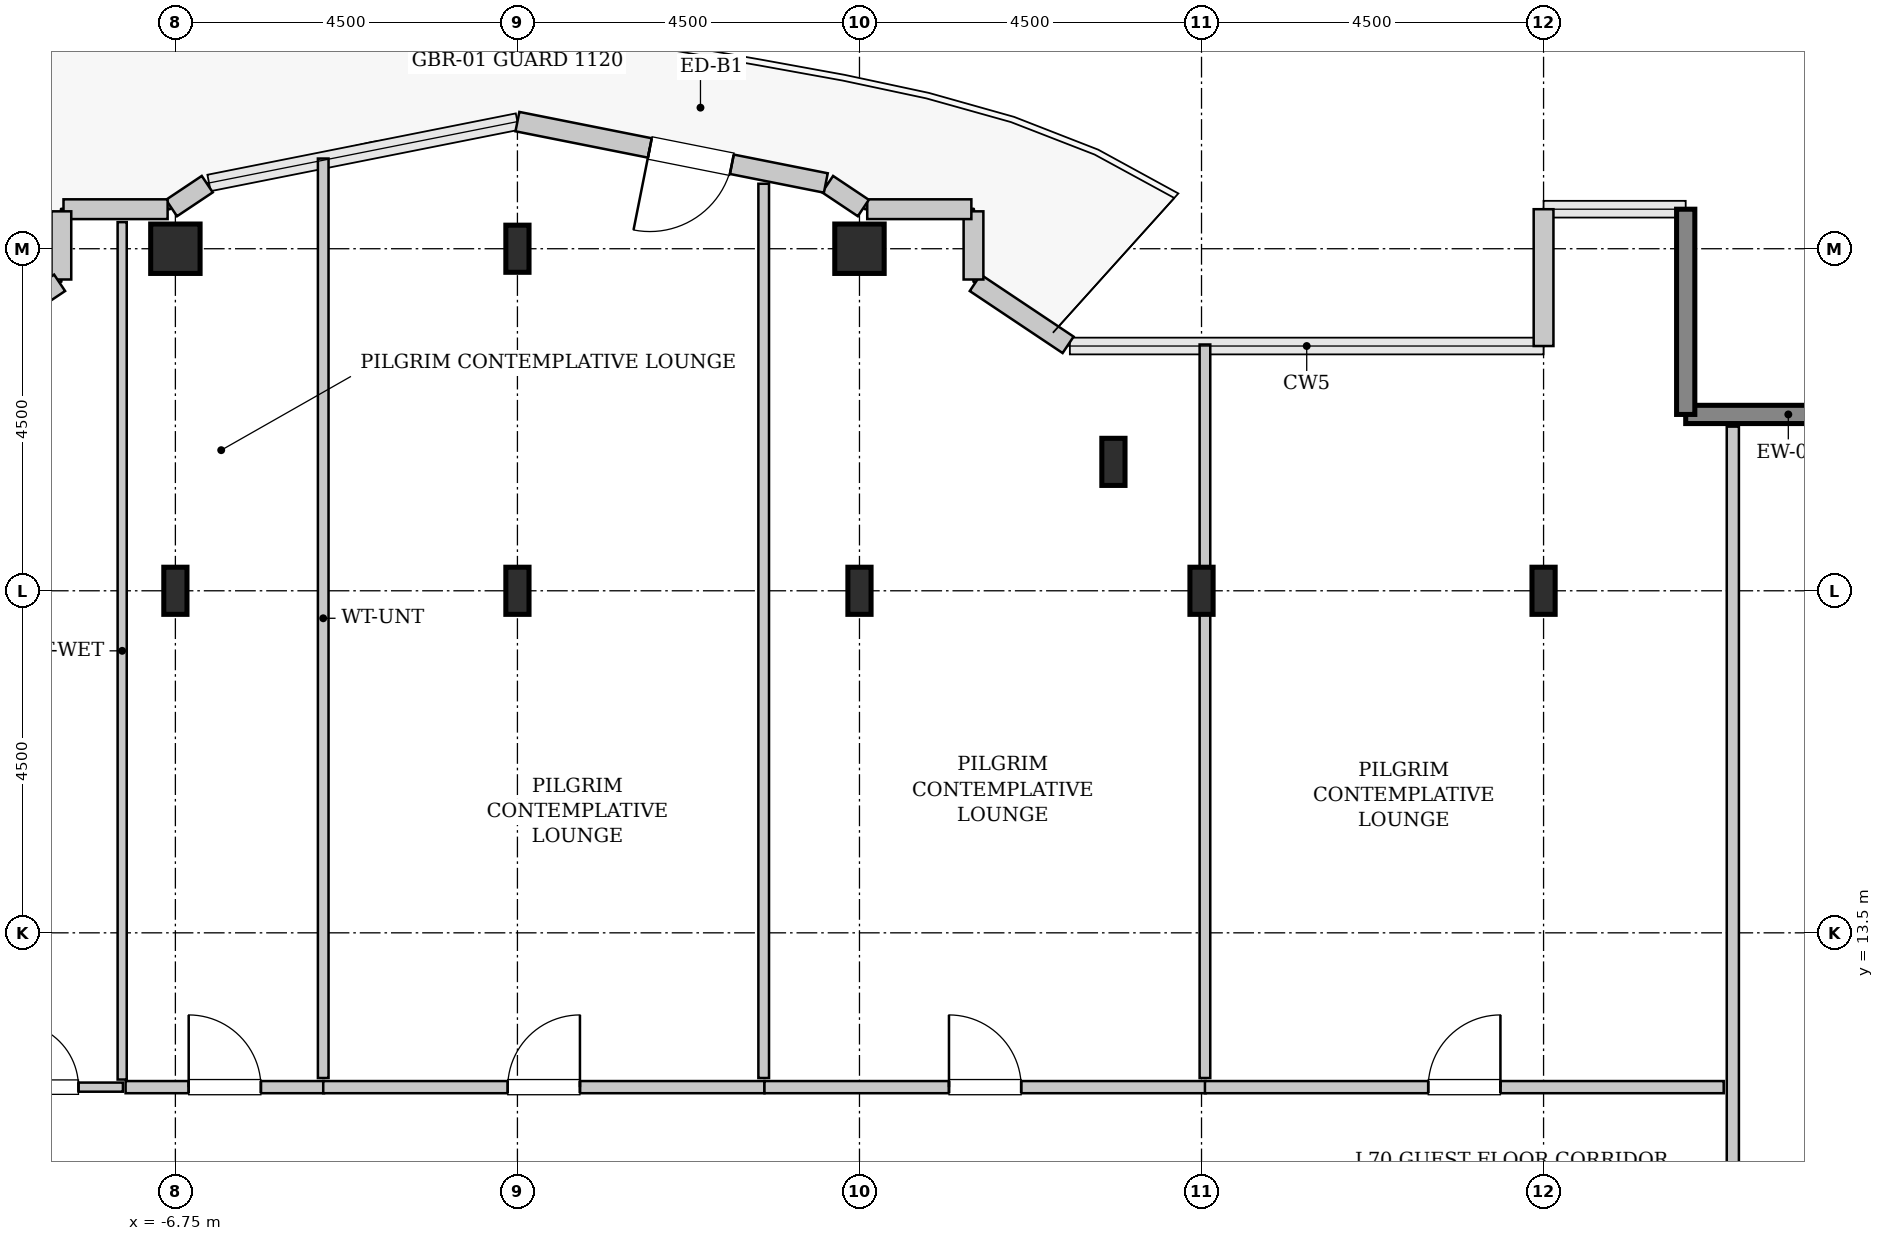
"""IFC4 building model, lengths in metres.
Left out: names, types, materials, properties, quantities, classifications, styles, units other than length and angle.
Written with IfcOpenShell. Run it as: python <this file> out.ifc"""

import sys

from ifc_helpers import new_model, si_unit, direction, frame, frame_2d, origin, origin_2d, place, context, subcontext, project, spatial, rectangle, hollow_rectangle, i_section, extrude, source, transform, mapped, element, fill, save


model = new_model("IFC4")
c1 = context("Model", 3, precision=1e-05, world=origin(), true_north=direction((0.0, 1.0)))
c2 = subcontext(c1, "Body", "Model", "MODEL_VIEW")
j1 = project(units=[si_unit("LENGTHUNIT", "METRE"), si_unit("PLANEANGLEUNIT", "RADIAN")], contexts=[c1])
p1 = place(None, origin())
s1 = spatial("IfcSite", under=j1, at=p1, CompositionType="ELEMENT")
p2 = place(p1, origin())
s2 = spatial("IfcBuilding", under=s1, at=p2, CompositionType="ELEMENT")
p3 = place(p2, frame((0.0, 0.0, 279.8)))
s3 = spatial("IfcBuildingStorey", under=s2, at=p3, CompositionType="ELEMENT", Elevation=279.8)
m1 = source(origin(), c2, "Body", "SweptSolid", [
    extrude(i_section(OverallWidth=0.305, OverallDepth=0.62, WebThickness=0.021, FlangeThickness=0.04, FilletRadius=0.027, at=origin_2d()), origin(), (0.0, 0.0, 1.0), 3.8),
])
p4 = place(p3, frame((-6.75, 18.0, 0.0), z_axis=(0.0, 0.0, 1.0), x_axis=(1.0, 0.0, 0.0)))
e1 = element("IfcColumn", 1, at=p4, inside=s3, PredefinedType="COLUMN", context=c2, shape_type="MappedRepresentation", body=[
    mapped(m1, transform((0.0, 0.0, 0.0), x_axis=(1.0, 0.0, 0.0), y_axis=(0.0, 1.0, 0.0), z_axis=(0.0, 0.0, 1.0), scale=1.0)),
])
m2 = source(origin(), c2, "Body", "SweptSolid", [
    extrude(hollow_rectangle(XDim=0.65, YDim=0.65, WallThickness=0.032, InnerFilletRadius=0.032, OuterFilletRadius=0.064, at=origin_2d()), origin(), (0.0, 0.0, 1.0), 3.8),
])
p5 = place(p3, frame((-6.75, 22.5, 0.0), z_axis=(0.0, 0.0, 1.0), x_axis=(1.0, 0.0, 0.0)))
e2 = element("IfcColumn", 2, at=p5, inside=s3, PredefinedType="COLUMN", context=c2, shape_type="MappedRepresentation", body=[
    mapped(m2, transform((0.0, 0.0, 0.0), x_axis=(1.0, 0.0, 0.0), y_axis=(0.0, 1.0, 0.0), z_axis=(0.0, 0.0, 1.0), scale=1.0)),
])
for number, where, z_axis, x_axis in (
    (3, (-2.25, 18.0, 0.0), (0.0, 0.0, 1.0), (1.0, 0.0, 0.0)),
    (4, (-2.25, 22.5, 0.0), (0.0, 0.0, 1.0), (1.0, 0.0, 0.0)),
    (5, (2.25, 18.0, 0.0), (0.0, 0.0, 1.0), (1.0, 0.0, 0.0)),
):
    element("IfcColumn", number, at=place(p3, frame(where, z_axis=z_axis, x_axis=x_axis)), inside=s3, PredefinedType="COLUMN", context=c2, shape_type="MappedRepresentation", body=[
        mapped(m1, transform((0.0, 0.0, 0.0), x_axis=(1.0, 0.0, 0.0), y_axis=(0.0, 1.0, 0.0), z_axis=(0.0, 0.0, 1.0), scale=1.0)),
    ])
p6 = place(p3, frame((2.25, 22.5, 0.0), z_axis=(0.0, 0.0, 1.0), x_axis=(1.0, 0.0, 0.0)))
e6 = element("IfcColumn", 6, at=p6, inside=s3, PredefinedType="COLUMN", context=c2, shape_type="MappedRepresentation", body=[
    mapped(m2, transform((0.0, 0.0, 0.0), x_axis=(1.0, 0.0, 0.0), y_axis=(0.0, 1.0, 0.0), z_axis=(0.0, 0.0, 1.0), scale=1.0)),
])
for number, where, z_axis, x_axis in (
    (7, (5.591, 19.696, 0.0), (0.0, 0.0, 1.0), (1.0, 0.0, 0.0)),
    (8, (6.75, 18.0, 0.0), (0.0, 0.0, 1.0), (1.0, 0.0, 0.0)),
    (9, (11.25, 18.0, 0.0), (0.0, 0.0, 1.0), (1.0, 0.0, 0.0)),
):
    element("IfcColumn", number, at=place(p3, frame(where, z_axis=z_axis, x_axis=x_axis)), inside=s3, PredefinedType="COLUMN", context=c2, shape_type="MappedRepresentation", body=[
        mapped(m1, transform((0.0, 0.0, 0.0), x_axis=(1.0, 0.0, 0.0), y_axis=(0.0, 1.0, 0.0), z_axis=(0.0, 0.0, 1.0), scale=1.0)),
    ])
m3 = source(origin(), c2, "Body", "SweptSolid", [
    extrude(rectangle(XDim=2.7, YDim=0.24, at=frame_2d((1.35, 0.0))), origin(), (0.0, 0.0, 1.0), 3.55),
])
for number, where, z_axis, x_axis in (
    (10, (15.82, 20.32, 0.0), (0.0, 0.0, 1.0), (-1.0, 0.0, 0.0)),
    (11, (13.12, 20.32, 0.0), (0.0, 0.0, 1.0), (0.0, 1.0, 0.0)),
):
    element("IfcWall", number, at=place(p3, frame(where, z_axis=z_axis, x_axis=x_axis)), inside=s3, PredefinedType="SHEAR", context=c2, shape_type="MappedRepresentation", body=[
        mapped(m3, transform((0.0, 0.0, 0.0), x_axis=(1.0, 0.0, 0.0), y_axis=(0.0, 1.0, 0.0), z_axis=(0.0, 0.0, 1.0), scale=1.0)),
    ])
m4 = source(origin(), c2, "Body", "SweptSolid", [
    extrude(rectangle(XDim=1.8, YDim=0.26, at=frame_2d((0.9, 0.0))), origin(), (0.0, 0.0, 1.0), 3.55),
])
p7 = place(p3, frame((11.25, 23.02, 0.0), z_axis=(0.0, 0.0, 1.0), x_axis=(0.0, -1.0, 0.0)))
e12 = element("IfcWall", 12, at=p7, inside=s3, PredefinedType="SOLIDWALL", context=c2, shape_type="MappedRepresentation", body=[
    mapped(m4, transform((0.0, 0.0, 0.0), x_axis=(1.0, 0.0, 0.0), y_axis=(0.0, 1.0, 0.0), z_axis=(0.0, 0.0, 1.0), scale=1.0)),
])
m5 = source(origin(), c2, "Body", "SweptSolid", [
    extrude(rectangle(XDim=1.469, YDim=0.26, at=frame_2d((0.734, 0.0))), origin(), (0.0, 0.0, 1.0), 3.55),
])
p8 = place(p3, frame((4.995, 21.236, 0.0), z_axis=(0.0, 0.0, 1.0), x_axis=(-0.831461760506, 0.555581983884, 0.0)))
e13 = element("IfcWall", 13, at=p8, inside=s3, PredefinedType="SOLIDWALL", context=c2, shape_type="MappedRepresentation", body=[
    mapped(m5, transform((0.0, 0.0, 0.0), x_axis=(1.0, 0.0, 0.0), y_axis=(0.0, 1.0, 0.0), z_axis=(0.0, 0.0, 1.0), scale=1.0)),
])
m6 = source(origin(), c2, "Body", "SweptSolid", [
    extrude(rectangle(XDim=0.897, YDim=0.26, at=frame_2d((0.448, 0.0))), origin(), (0.0, 0.0, 1.0), 3.55),
])
p9 = place(p3, frame((3.75, 22.095, 0.0), z_axis=(0.0, 0.0, 1.0), x_axis=(0.0, 1.0, 0.0)))
e14 = element("IfcWall", 14, at=p9, inside=s3, PredefinedType="SOLIDWALL", context=c2, shape_type="MappedRepresentation", body=[
    mapped(m6, transform((0.0, 0.0, 0.0), x_axis=(1.0, 0.0, 0.0), y_axis=(0.0, 1.0, 0.0), z_axis=(0.0, 0.0, 1.0), scale=1.0)),
])
m7 = source(origin(), c2, "Body", "SweptSolid", [
    extrude(rectangle(XDim=1.37, YDim=0.26, at=frame_2d((0.685, 0.0))), origin(), (0.0, 0.0, 1.0), 3.55),
])
p10 = place(p3, frame((3.722, 23.02, 0.0), z_axis=(0.0, 0.0, 1.0), x_axis=(-1.0, 0.0, 0.0)))
e15 = element("IfcWall", 15, at=p10, inside=s3, PredefinedType="SOLIDWALL", context=c2, shape_type="MappedRepresentation", body=[
    mapped(m7, transform((0.0, 0.0, 0.0), x_axis=(1.0, 0.0, 0.0), y_axis=(0.0, 1.0, 0.0), z_axis=(0.0, 0.0, 1.0), scale=1.0)),
])
m8 = source(origin(), c2, "Body", "SweptSolid", [
    extrude(rectangle(XDim=0.565, YDim=0.26, at=frame_2d((0.283, 0.0))), origin(), (0.0, 0.0, 1.0), 3.55),
])
p11 = place(p3, frame((2.301, 23.036, 0.0), z_axis=(0.0, 0.0, 1.0), x_axis=(-0.831651492666, 0.555297933317, 0.0)))
e16 = element("IfcWall", 16, at=p11, inside=s3, PredefinedType="SOLIDWALL", context=c2, shape_type="MappedRepresentation", body=[
    mapped(m8, transform((0.0, 0.0, 0.0), x_axis=(1.0, 0.0, 0.0), y_axis=(0.0, 1.0, 0.0), z_axis=(0.0, 0.0, 1.0), scale=1.0)),
])
m9 = source(origin(), c2, "Body", "SweptSolid", [
    extrude(rectangle(XDim=4.137, YDim=0.26, at=frame_2d((2.068, 0.0))), origin(), (0.0, 0.0, 1.0), 3.55),
])
p12 = place(p3, frame((1.807, 23.365, 0.0), z_axis=(0.0, 0.0, 1.0), x_axis=(-0.980782170794, 0.195105954428, 0.0)))
e17 = element("IfcWall", 17, at=p12, inside=s3, PredefinedType="SOLIDWALL", context=c2, shape_type="MappedRepresentation", body=[
    mapped(m9, transform((0.0, 0.0, 0.0), x_axis=(1.0, 0.0, 0.0), y_axis=(0.0, 1.0, 0.0), z_axis=(0.0, 0.0, 1.0), scale=1.0)),
])
p13 = place(p12, frame((1.261, 0.0, 0.0)))
e18 = element("IfcOpeningElement", 18, at=p13, cuts=e17, PredefinedType="OPENING", context=c2, shape_type="SweptSolid", body=[
    extrude(rectangle(XDim=1.1, YDim=2.2, at=frame_2d((0.55, 1.1))), frame((0.0, 0.14, 0.0), z_axis=(0.0, -1.0, 0.0), x_axis=(1.0, 0.0, 0.0)), (0.0, 0.0, 1.0), 0.28),
])
p14 = place(p3, frame((-6.331, 23.35, 0.0), z_axis=(0.0, 0.0, 1.0), x_axis=(-0.831651492666, -0.555297933317, 0.0)))
e19 = element("IfcWall", 19, at=p14, inside=s3, PredefinedType="SOLIDWALL", context=c2, shape_type="MappedRepresentation", body=[
    mapped(m8, transform((0.0, 0.0, 0.0), x_axis=(1.0, 0.0, 0.0), y_axis=(0.0, 1.0, 0.0), z_axis=(0.0, 0.0, 1.0), scale=1.0)),
])
p15 = place(p3, frame((-6.852, 23.02, 0.0), z_axis=(0.0, 0.0, 1.0), x_axis=(-1.0, 0.0, 0.0)))
e20 = element("IfcWall", 20, at=p15, inside=s3, PredefinedType="SOLIDWALL", context=c2, shape_type="MappedRepresentation", body=[
    mapped(m7, transform((0.0, 0.0, 0.0), x_axis=(1.0, 0.0, 0.0), y_axis=(0.0, 1.0, 0.0), z_axis=(0.0, 0.0, 1.0), scale=1.0)),
])
p16 = place(p3, frame((-8.25, 22.992, 0.0), z_axis=(0.0, 0.0, 1.0), x_axis=(0.0, -1.0, 0.0)))
e21 = element("IfcWall", 21, at=p16, inside=s3, PredefinedType="SOLIDWALL", context=c2, shape_type="MappedRepresentation", body=[
    mapped(m6, transform((0.0, 0.0, 0.0), x_axis=(1.0, 0.0, 0.0), y_axis=(0.0, 1.0, 0.0), z_axis=(0.0, 0.0, 1.0), scale=1.0)),
])
p17 = place(p3, frame((-8.273, 22.052, 0.0), z_axis=(0.0, 0.0, 1.0), x_axis=(-0.831461760506, -0.555581983884, 0.0)))
e22 = element("IfcWall", 22, at=p17, inside=s3, PredefinedType="SOLIDWALL", context=c2, shape_type="MappedRepresentation", body=[
    mapped(m5, transform((0.0, 0.0, 0.0), x_axis=(1.0, 0.0, 0.0), y_axis=(0.0, 1.0, 0.0), z_axis=(0.0, 0.0, 1.0), scale=1.0)),
])
m10 = source(origin(), c2, "Body", "SweptSolid", [
    extrude(rectangle(XDim=2.02, YDim=0.12, at=frame_2d((1.01, 0.0))), origin(), (0.0, 0.0, 1.0), 3.535),
])
p18 = place(p3, frame((-9.46, 11.47, 0.0), z_axis=(0.0, 0.0, 1.0), x_axis=(1.0, 0.0, 0.0)))
e23 = element("IfcWall", 23, at=p18, inside=s3, PredefinedType="PLUMBINGWALL", context=c2, shape_type="MappedRepresentation", body=[
    mapped(m10, transform((0.0, 0.0, 0.0), x_axis=(1.0, 0.0, 0.0), y_axis=(0.0, 1.0, 0.0), z_axis=(0.0, 0.0, 1.0), scale=1.0)),
])
p19 = place(p18, frame((0.585, 0.0, 0.0)))
e24 = element("IfcOpeningElement", 24, at=p19, cuts=e23, PredefinedType="OPENING", context=c2, shape_type="SweptSolid", body=[
    extrude(rectangle(XDim=0.85, YDim=2.1, at=frame_2d((0.425, 1.05))), frame((0.0, 0.07, 0.0), z_axis=(0.0, -1.0, 0.0), x_axis=(1.0, 0.0, 0.0)), (0.0, 0.0, 1.0), 0.14),
])
m11 = source(origin(), c2, "Body", "SweptSolid", [
    extrude(rectangle(XDim=11.28, YDim=0.12, at=frame_2d((5.64, 0.0))), origin(), (0.0, 0.0, 1.0), 3.535),
])
p20 = place(p3, frame((-7.45, 11.57, 0.0), z_axis=(0.0, 0.0, 1.0), x_axis=(0.0, 1.0, 0.0)))
e25 = element("IfcWall", 25, at=p20, inside=s3, PredefinedType="PLUMBINGWALL", context=c2, shape_type="MappedRepresentation", body=[
    mapped(m11, transform((0.0, 0.0, 0.0), x_axis=(1.0, 0.0, 0.0), y_axis=(0.0, 1.0, 0.0), z_axis=(0.0, 0.0, 1.0), scale=1.0)),
])
m12 = source(origin(), c2, "Body", "SweptSolid", [
    extrude(rectangle(XDim=13.965, YDim=0.16, at=frame_2d((6.982, 0.0))), origin(), (0.0, 0.0, 1.0), 3.535),
])
p21 = place(p3, frame((13.74, 6.195, 0.0), z_axis=(0.0, 0.0, 1.0), x_axis=(0.0, 1.0, 0.0)))
e26 = element("IfcWall", 26, at=p21, inside=s3, PredefinedType="PARTITIONING", context=c2, shape_type="MappedRepresentation", body=[
    mapped(m12, transform((0.0, 0.0, 0.0), x_axis=(1.0, 0.0, 0.0), y_axis=(0.0, 1.0, 0.0), z_axis=(0.0, 0.0, 1.0), scale=1.0)),
])
p22 = place(p21, frame((2.183, 0.0, 0.0)))
e27 = element("IfcOpeningElement", 27, at=p22, cuts=e26, PredefinedType="OPENING", context=c2, shape_type="SweptSolid", body=[
    extrude(rectangle(XDim=0.95, YDim=2.1, at=frame_2d((0.475, 1.05))), frame((0.0, 0.09, 0.0), z_axis=(0.0, -1.0, 0.0), x_axis=(1.0, 0.0, 0.0)), (0.0, 0.0, 1.0), 0.18),
])
m13 = source(origin(), c2, "Body", "SweptSolid", [
    extrude(rectangle(XDim=2.61, YDim=0.16, at=frame_2d((1.305, 0.0))), origin(), (0.0, 0.0, 1.0), 3.535),
])
p23 = place(p3, frame((-7.405, 11.47, 0.0), z_axis=(0.0, 0.0, 1.0), x_axis=(1.0, 0.0, 0.0)))
e28 = element("IfcWall", 28, at=p23, inside=s3, PredefinedType="PARTITIONING", context=c2, shape_type="MappedRepresentation", body=[
    mapped(m13, transform((0.0, 0.0, 0.0), x_axis=(1.0, 0.0, 0.0), y_axis=(0.0, 1.0, 0.0), z_axis=(0.0, 0.0, 1.0), scale=1.0)),
])
p24 = place(p23, frame((0.83, 0.0, 0.0)))
e29 = element("IfcOpeningElement", 29, at=p24, cuts=e28, PredefinedType="OPENING", context=c2, shape_type="SweptSolid", body=[
    extrude(rectangle(XDim=0.95, YDim=2.1, at=frame_2d((0.475, 1.05))), frame((0.0, 0.09, 0.0), z_axis=(0.0, -1.0, 0.0), x_axis=(1.0, 0.0, 0.0)), (0.0, 0.0, 1.0), 0.18),
])
m14 = source(origin(), c2, "Body", "SweptSolid", [
    extrude(rectangle(XDim=12.096, YDim=0.14, at=frame_2d((6.048, 0.0))), origin(), (0.0, 0.0, 1.0), 3.535),
])
p25 = place(p3, frame((-4.805, 11.59, 0.0), z_axis=(0.0, 0.0, 1.0), x_axis=(0.0, 1.0, 0.0)))
e30 = element("IfcWall", 30, at=p25, inside=s3, PredefinedType="PARTITIONING", context=c2, shape_type="MappedRepresentation", body=[
    mapped(m14, transform((0.0, 0.0, 0.0), x_axis=(1.0, 0.0, 0.0), y_axis=(0.0, 1.0, 0.0), z_axis=(0.0, 0.0, 1.0), scale=1.0)),
])
m15 = source(origin(), c2, "Body", "SweptSolid", [
    extrude(rectangle(XDim=5.805, YDim=0.16, at=frame_2d((2.902, 0.0))), origin(), (0.0, 0.0, 1.0), 3.535),
])
p26 = place(p3, frame((-4.805, 11.47, 0.0), z_axis=(0.0, 0.0, 1.0), x_axis=(1.0, 0.0, 0.0)))
e31 = element("IfcWall", 31, at=p26, inside=s3, PredefinedType="PARTITIONING", context=c2, shape_type="MappedRepresentation", body=[
    mapped(m15, transform((0.0, 0.0, 0.0), x_axis=(1.0, 0.0, 0.0), y_axis=(0.0, 1.0, 0.0), z_axis=(0.0, 0.0, 1.0), scale=1.0)),
])
p27 = place(p26, frame((2.427, 0.0, 0.0)))
e32 = element("IfcOpeningElement", 32, at=p27, cuts=e31, PredefinedType="OPENING", context=c2, shape_type="SweptSolid", body=[
    extrude(rectangle(XDim=0.95, YDim=2.1, at=frame_2d((0.475, 1.05))), frame((0.0, 0.09, 0.0), z_axis=(0.0, -1.0, 0.0), x_axis=(1.0, 0.0, 0.0)), (0.0, 0.0, 1.0), 0.18),
])
m16 = source(origin(), c2, "Body", "SweptSolid", [
    extrude(rectangle(XDim=11.765, YDim=0.14, at=frame_2d((5.882, 0.0))), origin(), (0.0, 0.0, 1.0), 3.535),
])
p28 = place(p3, frame((0.99, 11.59, 0.0), z_axis=(0.0, 0.0, 1.0), x_axis=(0.0, 1.0, 0.0)))
e33 = element("IfcWall", 33, at=p28, inside=s3, PredefinedType="PARTITIONING", context=c2, shape_type="MappedRepresentation", body=[
    mapped(m16, transform((0.0, 0.0, 0.0), x_axis=(1.0, 0.0, 0.0), y_axis=(0.0, 1.0, 0.0), z_axis=(0.0, 0.0, 1.0), scale=1.0)),
])
p29 = place(p3, frame((1.0, 11.47, 0.0), z_axis=(0.0, 0.0, 1.0), x_axis=(1.0, 0.0, 0.0)))
e34 = element("IfcWall", 34, at=p29, inside=s3, PredefinedType="PARTITIONING", context=c2, shape_type="MappedRepresentation", body=[
    mapped(m15, transform((0.0, 0.0, 0.0), x_axis=(1.0, 0.0, 0.0), y_axis=(0.0, 1.0, 0.0), z_axis=(0.0, 0.0, 1.0), scale=1.0)),
])
p30 = place(p29, frame((2.427, 0.0, 0.0)))
e35 = element("IfcOpeningElement", 35, at=p30, cuts=e34, PredefinedType="OPENING", context=c2, shape_type="SweptSolid", body=[
    extrude(rectangle(XDim=0.95, YDim=2.1, at=frame_2d((0.475, 1.05))), frame((0.0, 0.09, 0.0), z_axis=(0.0, -1.0, 0.0), x_axis=(1.0, 0.0, 0.0)), (0.0, 0.0, 1.0), 0.18),
])
m17 = source(origin(), c2, "Body", "SweptSolid", [
    extrude(rectangle(XDim=9.65, YDim=0.14, at=frame_2d((4.825, 0.0))), origin(), (0.0, 0.0, 1.0), 3.535),
])
p31 = place(p3, frame((6.795, 11.59, 0.0), z_axis=(0.0, 0.0, 1.0), x_axis=(0.0, 1.0, 0.0)))
e36 = element("IfcWall", 36, at=p31, inside=s3, PredefinedType="PARTITIONING", context=c2, shape_type="MappedRepresentation", body=[
    mapped(m17, transform((0.0, 0.0, 0.0), x_axis=(1.0, 0.0, 0.0), y_axis=(0.0, 1.0, 0.0), z_axis=(0.0, 0.0, 1.0), scale=1.0)),
])
m18 = source(origin(), c2, "Body", "SweptSolid", [
    extrude(rectangle(XDim=6.825, YDim=0.16, at=frame_2d((3.413, 0.0))), origin(), (0.0, 0.0, 1.0), 3.535),
])
p32 = place(p3, frame((6.795, 11.47, 0.0), z_axis=(0.0, 0.0, 1.0), x_axis=(1.0, 0.0, 0.0)))
e37 = element("IfcWall", 37, at=p32, inside=s3, PredefinedType="PARTITIONING", context=c2, shape_type="MappedRepresentation", body=[
    mapped(m18, transform((0.0, 0.0, 0.0), x_axis=(1.0, 0.0, 0.0), y_axis=(0.0, 1.0, 0.0), z_axis=(0.0, 0.0, 1.0), scale=1.0)),
])
p33 = place(p32, frame((2.938, 0.0, 0.0)))
e38 = element("IfcOpeningElement", 38, at=p33, cuts=e37, PredefinedType="OPENING", context=c2, shape_type="SweptSolid", body=[
    extrude(rectangle(XDim=0.95, YDim=2.1, at=frame_2d((0.475, 1.05))), frame((0.0, 0.09, 0.0), z_axis=(0.0, -1.0, 0.0), x_axis=(1.0, 0.0, 0.0)), (0.0, 0.0, 1.0), 0.18),
])
m19 = source(origin(), c2, "Body", "SweptSolid", [
    extrude(rectangle(XDim=1.1, YDim=2.2, at=frame_2d((0.55, 1.1))), frame((0.0, 0.025, 0.0), z_axis=(0.0, -1.0, 0.0), x_axis=(1.0, 0.0, 0.0)), (0.0, 0.0, 1.0), 0.05),
])
p34 = place(p13, origin())
e39 = element("IfcDoor", 39, at=p34, inside=s3, OperationType="SINGLE_SWING_RIGHT", PredefinedType="DOOR", context=c2, shape_type="MappedRepresentation", body=[
    mapped(m19, transform((0.0, 0.0, 0.0), x_axis=(1.0, 0.0, 0.0), y_axis=(0.0, 1.0, 0.0), z_axis=(0.0, 0.0, 1.0), scale=1.0)),
])
fill(e18, e39)
m20 = source(origin(), c2, "Body", "SweptSolid", [
    extrude(rectangle(XDim=0.85, YDim=2.1, at=frame_2d((0.425, 1.05))), frame((0.0, 0.025, 0.0), z_axis=(0.0, -1.0, 0.0), x_axis=(1.0, 0.0, 0.0)), (0.0, 0.0, 1.0), 0.05),
])
p35 = place(p19, origin())
e40 = element("IfcDoor", 40, at=p35, inside=s3, OperationType="SINGLE_SWING_LEFT", PredefinedType="DOOR", context=c2, shape_type="MappedRepresentation", body=[
    mapped(m20, transform((0.0, 0.0, 0.0), x_axis=(1.0, 0.0, 0.0), y_axis=(0.0, 1.0, 0.0), z_axis=(0.0, 0.0, 1.0), scale=1.0)),
])
fill(e24, e40)
m21 = source(origin(), c2, "Body", "SweptSolid", [
    extrude(rectangle(XDim=0.95, YDim=2.1, at=frame_2d((0.475, 1.05))), frame((0.0, 0.025, 0.0), z_axis=(0.0, -1.0, 0.0), x_axis=(1.0, 0.0, 0.0)), (0.0, 0.0, 1.0), 0.05),
])
p36 = place(p24, origin())
e41 = element("IfcDoor", 41, at=p36, inside=s3, OperationType="SINGLE_SWING_LEFT", PredefinedType="DOOR", context=c2, shape_type="MappedRepresentation", body=[
    mapped(m21, transform((0.0, 0.0, 0.0), x_axis=(1.0, 0.0, 0.0), y_axis=(0.0, 1.0, 0.0), z_axis=(0.0, 0.0, 1.0), scale=1.0)),
])
fill(e29, e41)
p37 = place(p27, origin())
e42 = element("IfcDoor", 42, at=p37, inside=s3, OperationType="SINGLE_SWING_RIGHT", PredefinedType="DOOR", context=c2, shape_type="MappedRepresentation", body=[
    mapped(m21, transform((0.0, 0.0, 0.0), x_axis=(1.0, 0.0, 0.0), y_axis=(0.0, 1.0, 0.0), z_axis=(0.0, 0.0, 1.0), scale=1.0)),
])
fill(e32, e42)
p38 = place(p30, origin())
e43 = element("IfcDoor", 43, at=p38, inside=s3, OperationType="SINGLE_SWING_LEFT", PredefinedType="DOOR", context=c2, shape_type="MappedRepresentation", body=[
    mapped(m21, transform((0.0, 0.0, 0.0), x_axis=(1.0, 0.0, 0.0), y_axis=(0.0, 1.0, 0.0), z_axis=(0.0, 0.0, 1.0), scale=1.0)),
])
fill(e35, e43)
p39 = place(p33, origin())
e44 = element("IfcDoor", 44, at=p39, inside=s3, OperationType="SINGLE_SWING_RIGHT", PredefinedType="DOOR", context=c2, shape_type="MappedRepresentation", body=[
    mapped(m21, transform((0.0, 0.0, 0.0), x_axis=(1.0, 0.0, 0.0), y_axis=(0.0, 1.0, 0.0), z_axis=(0.0, 0.0, 1.0), scale=1.0)),
])
fill(e38, e44)
save(model, sys.argv[1])
